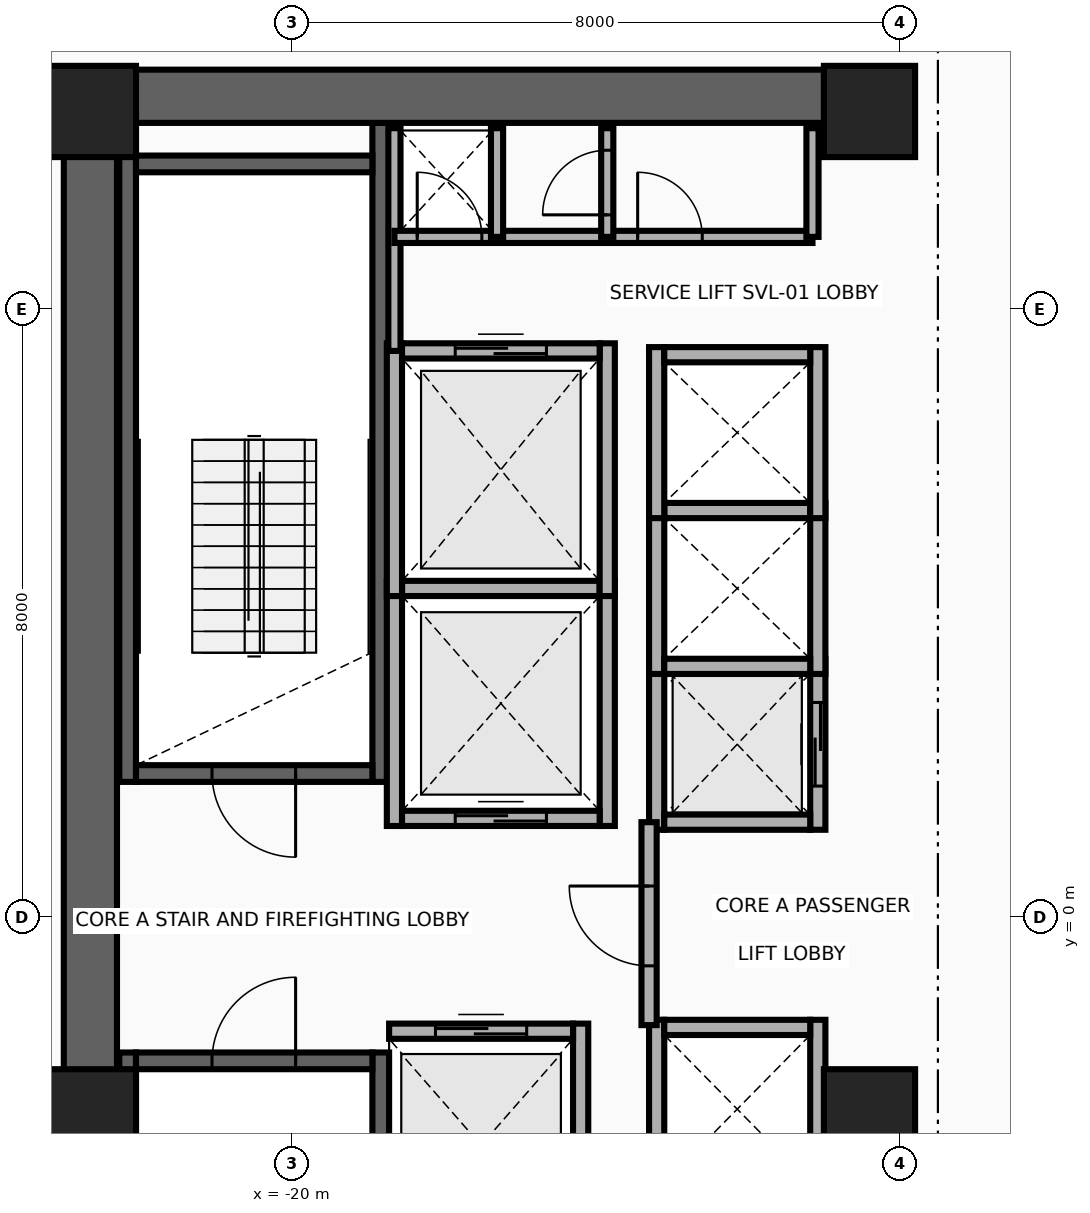
"""IFC4 building model, lengths in metres.
Left out: names, types, materials, properties, quantities, classifications, styles, units other than length and angle.
Written with IfcOpenShell. Run it as: python <this file> out.ifc"""

import sys

from ifc_helpers import new_model, si_unit, direction, frame, frame_2d, origin, origin_2d, place, context, subcontext, project, spatial, rectangle, extrude, source, transform, mapped, element, fill, save


model = new_model("IFC4")
c1 = context("Model", 3, precision=1e-05, world=origin(), true_north=direction((0.0, 1.0)))
c2 = subcontext(c1, "Body", "Model", "MODEL_VIEW")
j1 = project(units=[si_unit("LENGTHUNIT", "METRE"), si_unit("PLANEANGLEUNIT", "RADIAN")], contexts=[c1])
p1 = place(None, origin())
s1 = spatial("IfcSite", under=j1, at=p1, CompositionType="ELEMENT")
p2 = place(p1, origin())
s2 = spatial("IfcBuilding", under=s1, at=p2, CompositionType="ELEMENT")
p3 = place(p2, frame((0.0, 0.0, 120.5)))
s3 = spatial("IfcBuildingStorey", under=s2, at=p3, CompositionType="ELEMENT", Elevation=120.5)
for number, where, z_axis, x_axis in (
    (1, (-22.16, 1.78, 0.0), (0.0, 0.0, 1.0), (0.0, 1.0, 0.0)),
    (2, (-18.83, 1.78, 0.0), (0.0, 0.0, 1.0), (0.0, 1.0, 0.0)),
):
    element("IfcWall", number, at=place(p3, frame(where, z_axis=z_axis, x_axis=x_axis)), inside=s3, PredefinedType="SHEAR", context=c2, shape_type="SweptSolid", body=[
        extrude(rectangle(XDim=8.67, YDim=0.22, at=frame_2d((4.335, 0.0))), origin(), (0.0, 0.0, 1.0), 3.46),
    ])
p4 = place(p3, frame((-22.05, 1.89, 0.0), z_axis=(0.0, 0.0, 1.0), x_axis=(1.0, 0.0, 0.0)))
e3 = element("IfcWall", 3, at=p4, inside=s3, PredefinedType="SHEAR", context=c2, shape_type="SweptSolid", body=[
    extrude(rectangle(XDim=3.11, YDim=0.22, at=frame_2d((1.555, 0.0))), origin(), (0.0, 0.0, 1.0), 3.46),
])
p5 = place(p4, frame((1.0, 0.0, 0.0)))
e4 = element("IfcOpeningElement", 4, at=p5, cuts=e3, PredefinedType="OPENING", context=c2, shape_type="SweptSolid", body=[
    extrude(rectangle(XDim=1.1, YDim=2.15, at=frame_2d((0.55, 1.075))), frame((0.0, 0.125, 0.0), z_axis=(0.0, -1.0, 0.0), x_axis=(1.0, 0.0, 0.0)), (0.0, 0.0, 1.0), 0.25),
])
p6 = place(p3, frame((-22.05, 9.91, 0.0), z_axis=(0.0, 0.0, 1.0), x_axis=(1.0, 0.0, 0.0)))
e5 = element("IfcWall", 5, at=p6, inside=s3, PredefinedType="SHEAR", context=c2, shape_type="SweptSolid", body=[
    extrude(rectangle(XDim=3.11, YDim=0.22, at=frame_2d((1.555, 0.0))), origin(), (0.0, 0.0, 1.0), 3.46),
])
for number, where, z_axis, x_axis in (
    (6, (-22.16, -10.45, 0.0), (0.0, 0.0, 1.0), (0.0, 1.0, 0.0)),
    (7, (-18.83, -10.45, 0.0), (0.0, 0.0, 1.0), (0.0, 1.0, 0.0)),
):
    element("IfcWall", number, at=place(p3, frame(where, z_axis=z_axis, x_axis=x_axis)), inside=s3, PredefinedType="SHEAR", context=c2, shape_type="SweptSolid", body=[
        extrude(rectangle(XDim=8.67, YDim=0.22, at=frame_2d((4.335, 0.0))), origin(), (0.0, 0.0, 1.0), 3.46),
    ])
p7 = place(p3, frame((-22.05, -1.89, 0.0), z_axis=(0.0, 0.0, 1.0), x_axis=(1.0, 0.0, 0.0)))
e8 = element("IfcWall", 8, at=p7, inside=s3, PredefinedType="SHEAR", context=c2, shape_type="SweptSolid", body=[
    extrude(rectangle(XDim=3.11, YDim=0.22, at=frame_2d((1.555, 0.0))), origin(), (0.0, 0.0, 1.0), 3.46),
])
p8 = place(p7, frame((1.0, 0.0, 0.0)))
e9 = element("IfcOpeningElement", 9, at=p8, cuts=e8, PredefinedType="OPENING", context=c2, shape_type="SweptSolid", body=[
    extrude(rectangle(XDim=1.1, YDim=2.15, at=frame_2d((0.55, 1.075))), frame((0.0, 0.125, 0.0), z_axis=(0.0, -1.0, 0.0), x_axis=(1.0, 0.0, 0.0)), (0.0, 0.0, 1.0), 0.25),
])
p9 = place(p3, frame((-22.65, -11.15, 0.0), z_axis=(0.0, 0.0, 1.0), x_axis=(0.0, 1.0, 0.0)))
e10 = element("IfcWall", 10, at=p9, inside=s3, PredefinedType="SHEAR", context=c2, shape_type="SweptSolid", body=[
    extrude(rectangle(XDim=22.3, YDim=0.7, at=frame_2d((11.15, 0.0))), origin(), (0.0, 0.0, 1.0), 3.46),
])
p10 = place(p3, frame((-22.65, 10.8, 0.0), z_axis=(0.0, 0.0, 1.0), x_axis=(1.0, 0.0, 0.0)))
e11 = element("IfcWall", 11, at=p10, inside=s3, PredefinedType="SHEAR", context=c2, shape_type="SweptSolid", body=[
    extrude(rectangle(XDim=10.25, YDim=0.7, at=frame_2d((5.125, 0.0))), origin(), (0.0, 0.0, 1.0), 3.46),
])
m1 = source(origin(), c2, "Body", "SweptSolid", [
    extrude(rectangle(XDim=1.2, YDim=1.2, at=origin_2d()), origin(), (0.0, 0.0, 1.0), 3.7),
])
for number, where, z_axis, x_axis in (
    (12, (-22.65, -2.6, 0.0), (0.0, 0.0, 1.0), (1.0, 0.0, 0.0)),
    (13, (-12.4, -2.6, 0.0), (0.0, 0.0, 1.0), (1.0, 0.0, 0.0)),
    (14, (-22.65, 10.6, 0.0), (0.0, 0.0, 1.0), (1.0, 0.0, 0.0)),
    (15, (-12.4, 10.6, 0.0), (0.0, 0.0, 1.0), (1.0, 0.0, 0.0)),
):
    element("IfcColumn", number, at=place(p3, frame(where, z_axis=z_axis, x_axis=x_axis)), inside=s3, PredefinedType="COLUMN", context=c2, shape_type="MappedRepresentation", body=[
        mapped(m1, transform((0.0, 0.0, 0.0), x_axis=(1.0, 0.0, 0.0), y_axis=(0.0, 1.0, 0.0), z_axis=(0.0, 0.0, 1.0), scale=1.0)),
    ])
for number, where, z_axis, x_axis in (
    (16, (-18.65, 1.2, 0.0), (0.0, 0.0, 1.0), (0.0, 1.0, 0.0)),
    (17, (-15.85, 1.2, 0.0), (0.0, 0.0, 1.0), (0.0, 1.0, 0.0)),
):
    element("IfcWall", number, at=place(p3, frame(where, z_axis=z_axis, x_axis=x_axis)), inside=s3, PredefinedType="MOVABLE", context=c2, shape_type="SweptSolid", body=[
        extrude(rectangle(XDim=3.225, YDim=0.2, at=frame_2d((1.613, 0.0))), origin(), (0.0, 0.0, 1.0), 3.46),
    ])
p11 = place(p3, frame((-18.55, 1.3, 0.0), z_axis=(0.0, 0.0, 1.0), x_axis=(1.0, 0.0, 0.0)))
e18 = element("IfcWall", 18, at=p11, inside=s3, PredefinedType="MOVABLE", context=c2, shape_type="SweptSolid", body=[
    extrude(rectangle(XDim=2.6, YDim=0.2, at=frame_2d((1.3, 0.0))), origin(), (0.0, 0.0, 1.0), 3.46),
])
p12 = place(p11, frame((0.7, 0.0, 0.0)))
e19 = element("IfcOpeningElement", 19, at=p12, cuts=e18, PredefinedType="OPENING", context=c2, shape_type="SweptSolid", body=[
    extrude(rectangle(XDim=1.2, YDim=2.1, at=frame_2d((0.6, 1.05))), frame((0.0, 0.115, 0.0), z_axis=(0.0, -1.0, 0.0), x_axis=(1.0, 0.0, 0.0)), (0.0, 0.0, 1.0), 0.23),
])
p13 = place(p3, frame((-18.55, 4.325, 0.0), z_axis=(0.0, 0.0, 1.0), x_axis=(1.0, 0.0, 0.0)))
e20 = element("IfcWall", 20, at=p13, inside=s3, PredefinedType="MOVABLE", context=c2, shape_type="SweptSolid", body=[
    extrude(rectangle(XDim=2.6, YDim=0.2, at=frame_2d((1.3, 0.0))), origin(), (0.0, 0.0, 1.0), 3.46),
])
p14 = place(p3, frame((-16.2, -4.6, 0.0), z_axis=(0.0, 0.0, 1.0), x_axis=(0.0, 1.0, 0.0)))
e21 = element("IfcWall", 21, at=p14, inside=s3, PredefinedType="MOVABLE", context=c2, shape_type="SweptSolid", body=[
    extrude(rectangle(XDim=3.2, YDim=0.2, at=frame_2d((1.6, 0.0))), origin(), (0.0, 0.0, 1.0), 3.46),
])
p15 = place(p3, frame((-18.72, -1.5, 0.0), z_axis=(0.0, 0.0, 1.0), x_axis=(1.0, 0.0, 0.0)))
e22 = element("IfcWall", 22, at=p15, inside=s3, PredefinedType="MOVABLE", context=c2, shape_type="SweptSolid", body=[
    extrude(rectangle(XDim=2.42, YDim=0.2, at=frame_2d((1.21, 0.0))), origin(), (0.0, 0.0, 1.0), 3.46),
])
p16 = place(p15, frame((0.61, 0.0, 0.0)))
e23 = element("IfcOpeningElement", 23, at=p16, cuts=e22, PredefinedType="OPENING", context=c2, shape_type="SweptSolid", body=[
    extrude(rectangle(XDim=1.2, YDim=2.1, at=frame_2d((0.6, 1.05))), frame((0.0, 0.115, 0.0), z_axis=(0.0, -1.0, 0.0), x_axis=(1.0, 0.0, 0.0)), (0.0, 0.0, 1.0), 0.23),
])
for number, where, z_axis, x_axis in (
    (24, (-18.65, 4.225, 0.0), (0.0, 0.0, 1.0), (0.0, 1.0, 0.0)),
    (25, (-15.85, 4.225, 0.0), (0.0, 0.0, 1.0), (0.0, 1.0, 0.0)),
):
    element("IfcWall", number, at=place(p3, frame(where, z_axis=z_axis, x_axis=x_axis)), inside=s3, PredefinedType="MOVABLE", context=c2, shape_type="SweptSolid", body=[
        extrude(rectangle(XDim=3.325, YDim=0.2, at=frame_2d((1.663, 0.0))), origin(), (0.0, 0.0, 1.0), 3.46),
    ])
p17 = place(p3, frame((-18.55, 7.45, 0.0), z_axis=(0.0, 0.0, 1.0), x_axis=(1.0, 0.0, 0.0)))
e26 = element("IfcWall", 26, at=p17, inside=s3, PredefinedType="MOVABLE", context=c2, shape_type="SweptSolid", body=[
    extrude(rectangle(XDim=2.6, YDim=0.2, at=frame_2d((1.3, 0.0))), origin(), (0.0, 0.0, 1.0), 3.46),
])
p18 = place(p17, frame((0.7, 0.0, 0.0)))
e27 = element("IfcOpeningElement", 27, at=p18, cuts=e26, PredefinedType="OPENING", context=c2, shape_type="SweptSolid", body=[
    extrude(rectangle(XDim=1.2, YDim=2.1, at=frame_2d((0.6, 1.05))), frame((0.0, 0.115, 0.0), z_axis=(0.0, -1.0, 0.0), x_axis=(1.0, 0.0, 0.0)), (0.0, 0.0, 1.0), 0.23),
])
p19 = place(p3, frame((-15.2, 1.15, 0.0), z_axis=(0.0, 0.0, 1.0), x_axis=(0.0, 1.0, 0.0)))
e28 = element("IfcWall", 28, at=p19, inside=s3, PredefinedType="MOVABLE", context=c2, shape_type="SweptSolid", body=[
    extrude(rectangle(XDim=2.25, YDim=0.2, at=frame_2d((1.125, 0.0))), origin(), (0.0, 0.0, 1.0), 3.46),
])
p20 = place(p3, frame((-13.08, 1.15, 0.0), z_axis=(0.0, 0.0, 1.0), x_axis=(0.0, 1.0, 0.0)))
e29 = element("IfcWall", 29, at=p20, inside=s3, PredefinedType="MOVABLE", context=c2, shape_type="SweptSolid", body=[
    extrude(rectangle(XDim=2.25, YDim=0.2, at=frame_2d((1.125, 0.0))), origin(), (0.0, 0.0, 1.0), 3.46),
])
p21 = place(p20, frame((0.575, 0.0, 0.0)))
e30 = element("IfcOpeningElement", 30, at=p21, cuts=e29, PredefinedType="OPENING", context=c2, shape_type="SweptSolid", body=[
    extrude(rectangle(XDim=1.1, YDim=2.1, at=frame_2d((0.55, 1.05))), frame((0.0, 0.115, 0.0), z_axis=(0.0, -1.0, 0.0), x_axis=(1.0, 0.0, 0.0)), (0.0, 0.0, 1.0), 0.23),
])
p22 = place(p3, frame((-15.1, 1.25, 0.0), z_axis=(0.0, 0.0, 1.0), x_axis=(1.0, 0.0, 0.0)))
e31 = element("IfcWall", 31, at=p22, inside=s3, PredefinedType="MOVABLE", context=c2, shape_type="SweptSolid", body=[
    extrude(rectangle(XDim=1.92, YDim=0.2, at=frame_2d((0.96, 0.0))), origin(), (0.0, 0.0, 1.0), 3.46),
])
for number, where, z_axis, x_axis in (
    (32, (-15.2, 3.2, 0.0), (0.0, 0.0, 1.0), (0.0, 1.0, 0.0)),
    (33, (-13.08, 3.2, 0.0), (0.0, 0.0, 1.0), (0.0, 1.0, 0.0)),
):
    element("IfcWall", number, at=place(p3, frame(where, z_axis=z_axis, x_axis=x_axis)), inside=s3, PredefinedType="MOVABLE", context=c2, shape_type="SweptSolid", body=[
        extrude(rectangle(XDim=2.25, YDim=0.2, at=frame_2d((1.125, 0.0))), origin(), (0.0, 0.0, 1.0), 3.46),
    ])
for number, where, z_axis, x_axis in (
    (34, (-15.1, 3.3, 0.0), (0.0, 0.0, 1.0), (1.0, 0.0, 0.0)),
    (35, (-15.1, 5.35, 0.0), (0.0, 0.0, 1.0), (1.0, 0.0, 0.0)),
):
    element("IfcWall", number, at=place(p3, frame(where, z_axis=z_axis, x_axis=x_axis)), inside=s3, PredefinedType="MOVABLE", context=c2, shape_type="SweptSolid", body=[
        extrude(rectangle(XDim=1.92, YDim=0.2, at=frame_2d((0.96, 0.0))), origin(), (0.0, 0.0, 1.0), 3.46),
    ])
for number, where, z_axis, x_axis in (
    (36, (-15.2, 5.25, 0.0), (0.0, 0.0, 1.0), (0.0, 1.0, 0.0)),
    (37, (-13.08, 5.25, 0.0), (0.0, 0.0, 1.0), (0.0, 1.0, 0.0)),
):
    element("IfcWall", number, at=place(p3, frame(where, z_axis=z_axis, x_axis=x_axis)), inside=s3, PredefinedType="MOVABLE", context=c2, shape_type="SweptSolid", body=[
        extrude(rectangle(XDim=2.25, YDim=0.2, at=frame_2d((1.125, 0.0))), origin(), (0.0, 0.0, 1.0), 3.46),
    ])
p23 = place(p3, frame((-15.1, 7.4, 0.0), z_axis=(0.0, 0.0, 1.0), x_axis=(1.0, 0.0, 0.0)))
e38 = element("IfcWall", 38, at=p23, inside=s3, PredefinedType="MOVABLE", context=c2, shape_type="SweptSolid", body=[
    extrude(rectangle(XDim=1.92, YDim=0.2, at=frame_2d((0.96, 0.0))), origin(), (0.0, 0.0, 1.0), 3.46),
])
for number, where, z_axis, x_axis in (
    (39, (-15.2, -3.7, 0.0), (0.0, 0.0, 1.0), (0.0, 1.0, 0.0)),
    (40, (-13.08, -3.7, 0.0), (0.0, 0.0, 1.0), (0.0, 1.0, 0.0)),
):
    element("IfcWall", number, at=place(p3, frame(where, z_axis=z_axis, x_axis=x_axis)), inside=s3, PredefinedType="MOVABLE", context=c2, shape_type="SweptSolid", body=[
        extrude(rectangle(XDim=2.35, YDim=0.2, at=frame_2d((1.175, 0.0))), origin(), (0.0, 0.0, 1.0), 3.46),
    ])
p24 = place(p3, frame((-15.1, -1.45, 0.0), z_axis=(0.0, 0.0, 1.0), x_axis=(1.0, 0.0, 0.0)))
e41 = element("IfcWall", 41, at=p24, inside=s3, PredefinedType="MOVABLE", context=c2, shape_type="SweptSolid", body=[
    extrude(rectangle(XDim=1.92, YDim=0.2, at=frame_2d((0.96, 0.0))), origin(), (0.0, 0.0, 1.0), 3.46),
])
p25 = place(p3, frame((-15.3, -1.42, 0.0), z_axis=(0.0, 0.0, 1.0), x_axis=(0.0, 1.0, 0.0)))
e42 = element("IfcWall", 42, at=p25, inside=s3, PredefinedType="PARTITIONING", context=c2, shape_type="SweptSolid", body=[
    extrude(rectangle(XDim=2.67, YDim=0.2, at=frame_2d((1.335, 0.0))), origin(), (0.0, 0.0, 1.0), 3.46),
])
p26 = place(p25, frame((0.78, 0.0, 0.0)))
e43 = element("IfcOpeningElement", 43, at=p26, cuts=e42, PredefinedType="OPENING", context=c2, shape_type="SweptSolid", body=[
    extrude(rectangle(XDim=1.05, YDim=2.15, at=frame_2d((0.525, 1.075))), frame((0.0, 0.115, 0.0), z_axis=(0.0, -1.0, 0.0), x_axis=(1.0, 0.0, 0.0)), (0.0, 0.0, 1.0), 0.23),
])
p27 = place(p3, frame((-18.65, 7.45, 0.0), z_axis=(0.0, 0.0, 1.0), x_axis=(0.0, 1.0, 0.0)))
e44 = element("IfcWall", 44, at=p27, inside=s3, PredefinedType="PARTITIONING", context=c2, shape_type="SweptSolid", body=[
    extrude(rectangle(XDim=2.93, YDim=0.16, at=frame_2d((1.465, 0.0))), origin(), (0.0, 0.0, 1.0), 3.46),
])
p28 = place(p3, frame((-18.65, 8.95, 0.0), z_axis=(0.0, 0.0, 1.0), x_axis=(1.0, 0.0, 0.0)))
e45 = element("IfcWall", 45, at=p28, inside=s3, PredefinedType="PARTITIONING", context=c2, shape_type="SweptSolid", body=[
    extrude(rectangle(XDim=5.5, YDim=0.16, at=frame_2d((2.75, 0.0))), origin(), (0.0, 0.0, 1.0), 3.46),
])
p29 = place(p28, frame((0.3, 0.0, 0.0)))
e46 = element("IfcOpeningElement", 46, at=p29, cuts=e45, PredefinedType="OPENING", context=c2, shape_type="SweptSolid", body=[
    extrude(rectangle(XDim=0.85, YDim=2.05, at=frame_2d((0.425, 1.025))), frame((0.0, 0.095, 0.0), z_axis=(0.0, -1.0, 0.0), x_axis=(1.0, 0.0, 0.0)), (0.0, 0.0, 1.0), 0.19),
])
p30 = place(p28, frame((3.2, 0.0, 0.0)))
e47 = element("IfcOpeningElement", 47, at=p30, cuts=e45, PredefinedType="OPENING", context=c2, shape_type="SweptSolid", body=[
    extrude(rectangle(XDim=0.85, YDim=2.05, at=frame_2d((0.425, 1.025))), frame((0.0, 0.095, 0.0), z_axis=(0.0, -1.0, 0.0), x_axis=(1.0, 0.0, 0.0)), (0.0, 0.0, 1.0), 0.19),
])
for number, where, z_axis, x_axis in (
    (48, (-13.15, 8.95, 0.0), (0.0, 0.0, 1.0), (0.0, 1.0, 0.0)),
    (49, (-17.3, 8.95, 0.0), (0.0, 0.0, 1.0), (0.0, 1.0, 0.0)),
):
    element("IfcWall", number, at=place(p3, frame(where, z_axis=z_axis, x_axis=x_axis)), inside=s3, PredefinedType="PARTITIONING", context=c2, shape_type="SweptSolid", body=[
        extrude(rectangle(XDim=1.43, YDim=0.16, at=frame_2d((0.715, 0.0))), origin(), (0.0, 0.0, 1.0), 3.46),
    ])
p31 = place(p3, frame((-15.85, 8.95, 0.0), z_axis=(0.0, 0.0, 1.0), x_axis=(0.0, 1.0, 0.0)))
e50 = element("IfcWall", 50, at=p31, inside=s3, PredefinedType="PARTITIONING", context=c2, shape_type="SweptSolid", body=[
    extrude(rectangle(XDim=1.43, YDim=0.16, at=frame_2d((0.715, 0.0))), origin(), (0.0, 0.0, 1.0), 3.46),
])
p32 = place(p31, frame((0.29, 0.0, 0.0)))
e51 = element("IfcOpeningElement", 51, at=p32, cuts=e50, PredefinedType="OPENING", context=c2, shape_type="SweptSolid", body=[
    extrude(rectangle(XDim=0.85, YDim=2.05, at=frame_2d((0.425, 1.025))), frame((0.0, 0.095, 0.0), z_axis=(0.0, -1.0, 0.0), x_axis=(1.0, 0.0, 0.0)), (0.0, 0.0, 1.0), 0.19),
])
p33 = place(p12, origin())
e52 = element("IfcDoor", 52, at=p33, inside=s3, OperationType="DOUBLE_DOOR_SLIDING", PredefinedType="DOOR", context=c2, shape_type="SweptSolid", body=[
    extrude(rectangle(XDim=1.2, YDim=2.1, at=frame_2d((0.6, 1.05))), frame((0.0, 0.025, 0.0), z_axis=(0.0, -1.0, 0.0), x_axis=(1.0, 0.0, 0.0)), (0.0, 0.0, 1.0), 0.05),
])
fill(e19, e52)
p34 = place(p16, origin())
e53 = element("IfcDoor", 53, at=p34, inside=s3, OperationType="DOUBLE_DOOR_SLIDING", PredefinedType="DOOR", context=c2, shape_type="SweptSolid", body=[
    extrude(rectangle(XDim=1.2, YDim=2.1, at=frame_2d((0.6, 1.05))), frame((0.0, 0.025, 0.0), z_axis=(0.0, -1.0, 0.0), x_axis=(1.0, 0.0, 0.0)), (0.0, 0.0, 1.0), 0.05),
])
fill(e23, e53)
p35 = place(p18, origin())
e54 = element("IfcDoor", 54, at=p35, inside=s3, OperationType="DOUBLE_DOOR_SLIDING", PredefinedType="DOOR", context=c2, shape_type="SweptSolid", body=[
    extrude(rectangle(XDim=1.2, YDim=2.1, at=frame_2d((0.6, 1.05))), frame((0.0, 0.025, 0.0), z_axis=(0.0, -1.0, 0.0), x_axis=(1.0, 0.0, 0.0)), (0.0, 0.0, 1.0), 0.05),
])
fill(e27, e54)
p36 = place(p21, origin())
e55 = element("IfcDoor", 55, at=p36, inside=s3, OperationType="DOUBLE_DOOR_SLIDING", PredefinedType="DOOR", context=c2, shape_type="SweptSolid", body=[
    extrude(rectangle(XDim=1.1, YDim=2.1, at=frame_2d((0.55, 1.05))), frame((0.0, 0.025, 0.0), z_axis=(0.0, -1.0, 0.0), x_axis=(1.0, 0.0, 0.0)), (0.0, 0.0, 1.0), 0.05),
])
fill(e30, e55)
p37 = place(p26, origin())
e56 = element("IfcDoor", 56, at=p37, inside=s3, OperationType="SINGLE_SWING_RIGHT", PredefinedType="DOOR", context=c2, shape_type="SweptSolid", body=[
    extrude(rectangle(XDim=1.05, YDim=2.15, at=frame_2d((0.525, 1.075))), frame((0.0, 0.025, 0.0), z_axis=(0.0, -1.0, 0.0), x_axis=(1.0, 0.0, 0.0)), (0.0, 0.0, 1.0), 0.05),
])
fill(e43, e56)
p38 = place(p5, frame((1.1, 0.0, 0.0), z_axis=(0.0, 0.0, 1.0), x_axis=(-1.0, 0.0, 0.0)))
e57 = element("IfcDoor", 57, at=p38, inside=s3, OperationType="SINGLE_SWING_LEFT", PredefinedType="DOOR", context=c2, shape_type="SweptSolid", body=[
    extrude(rectangle(XDim=1.1, YDim=2.15, at=frame_2d((0.55, 1.075))), frame((0.0, 0.025, 0.0), z_axis=(0.0, -1.0, 0.0), x_axis=(1.0, 0.0, 0.0)), (0.0, 0.0, 1.0), 0.05),
])
fill(e4, e57)
p39 = place(p8, origin())
e58 = element("IfcDoor", 58, at=p39, inside=s3, OperationType="SINGLE_SWING_RIGHT", PredefinedType="DOOR", context=c2, shape_type="SweptSolid", body=[
    extrude(rectangle(XDim=1.1, YDim=2.15, at=frame_2d((0.55, 1.075))), frame((0.0, 0.025, 0.0), z_axis=(0.0, -1.0, 0.0), x_axis=(1.0, 0.0, 0.0)), (0.0, 0.0, 1.0), 0.05),
])
fill(e9, e58)
p40 = place(p29, origin())
e59 = element("IfcDoor", 59, at=p40, inside=s3, OperationType="SINGLE_SWING_LEFT", PredefinedType="DOOR", context=c2, shape_type="SweptSolid", body=[
    extrude(rectangle(XDim=0.85, YDim=2.05, at=frame_2d((0.425, 1.025))), frame((0.0, 0.025, 0.0), z_axis=(0.0, -1.0, 0.0), x_axis=(1.0, 0.0, 0.0)), (0.0, 0.0, 1.0), 0.05),
])
fill(e46, e59)
p41 = place(p30, origin())
e60 = element("IfcDoor", 60, at=p41, inside=s3, OperationType="SINGLE_SWING_RIGHT", PredefinedType="DOOR", context=c2, shape_type="SweptSolid", body=[
    extrude(rectangle(XDim=0.85, YDim=2.05, at=frame_2d((0.425, 1.025))), frame((0.0, 0.025, 0.0), z_axis=(0.0, -1.0, 0.0), x_axis=(1.0, 0.0, 0.0)), (0.0, 0.0, 1.0), 0.05),
])
fill(e47, e60)
p42 = place(p32, origin())
e61 = element("IfcDoor", 61, at=p42, inside=s3, OperationType="SINGLE_SWING_LEFT", PredefinedType="DOOR", context=c2, shape_type="SweptSolid", body=[
    extrude(rectangle(XDim=0.85, YDim=2.05, at=frame_2d((0.425, 1.025))), frame((0.0, 0.025, 0.0), z_axis=(0.0, -1.0, 0.0), x_axis=(1.0, 0.0, 0.0)), (0.0, 0.0, 1.0), 0.05),
])
fill(e51, e61)
save(model, sys.argv[1])
